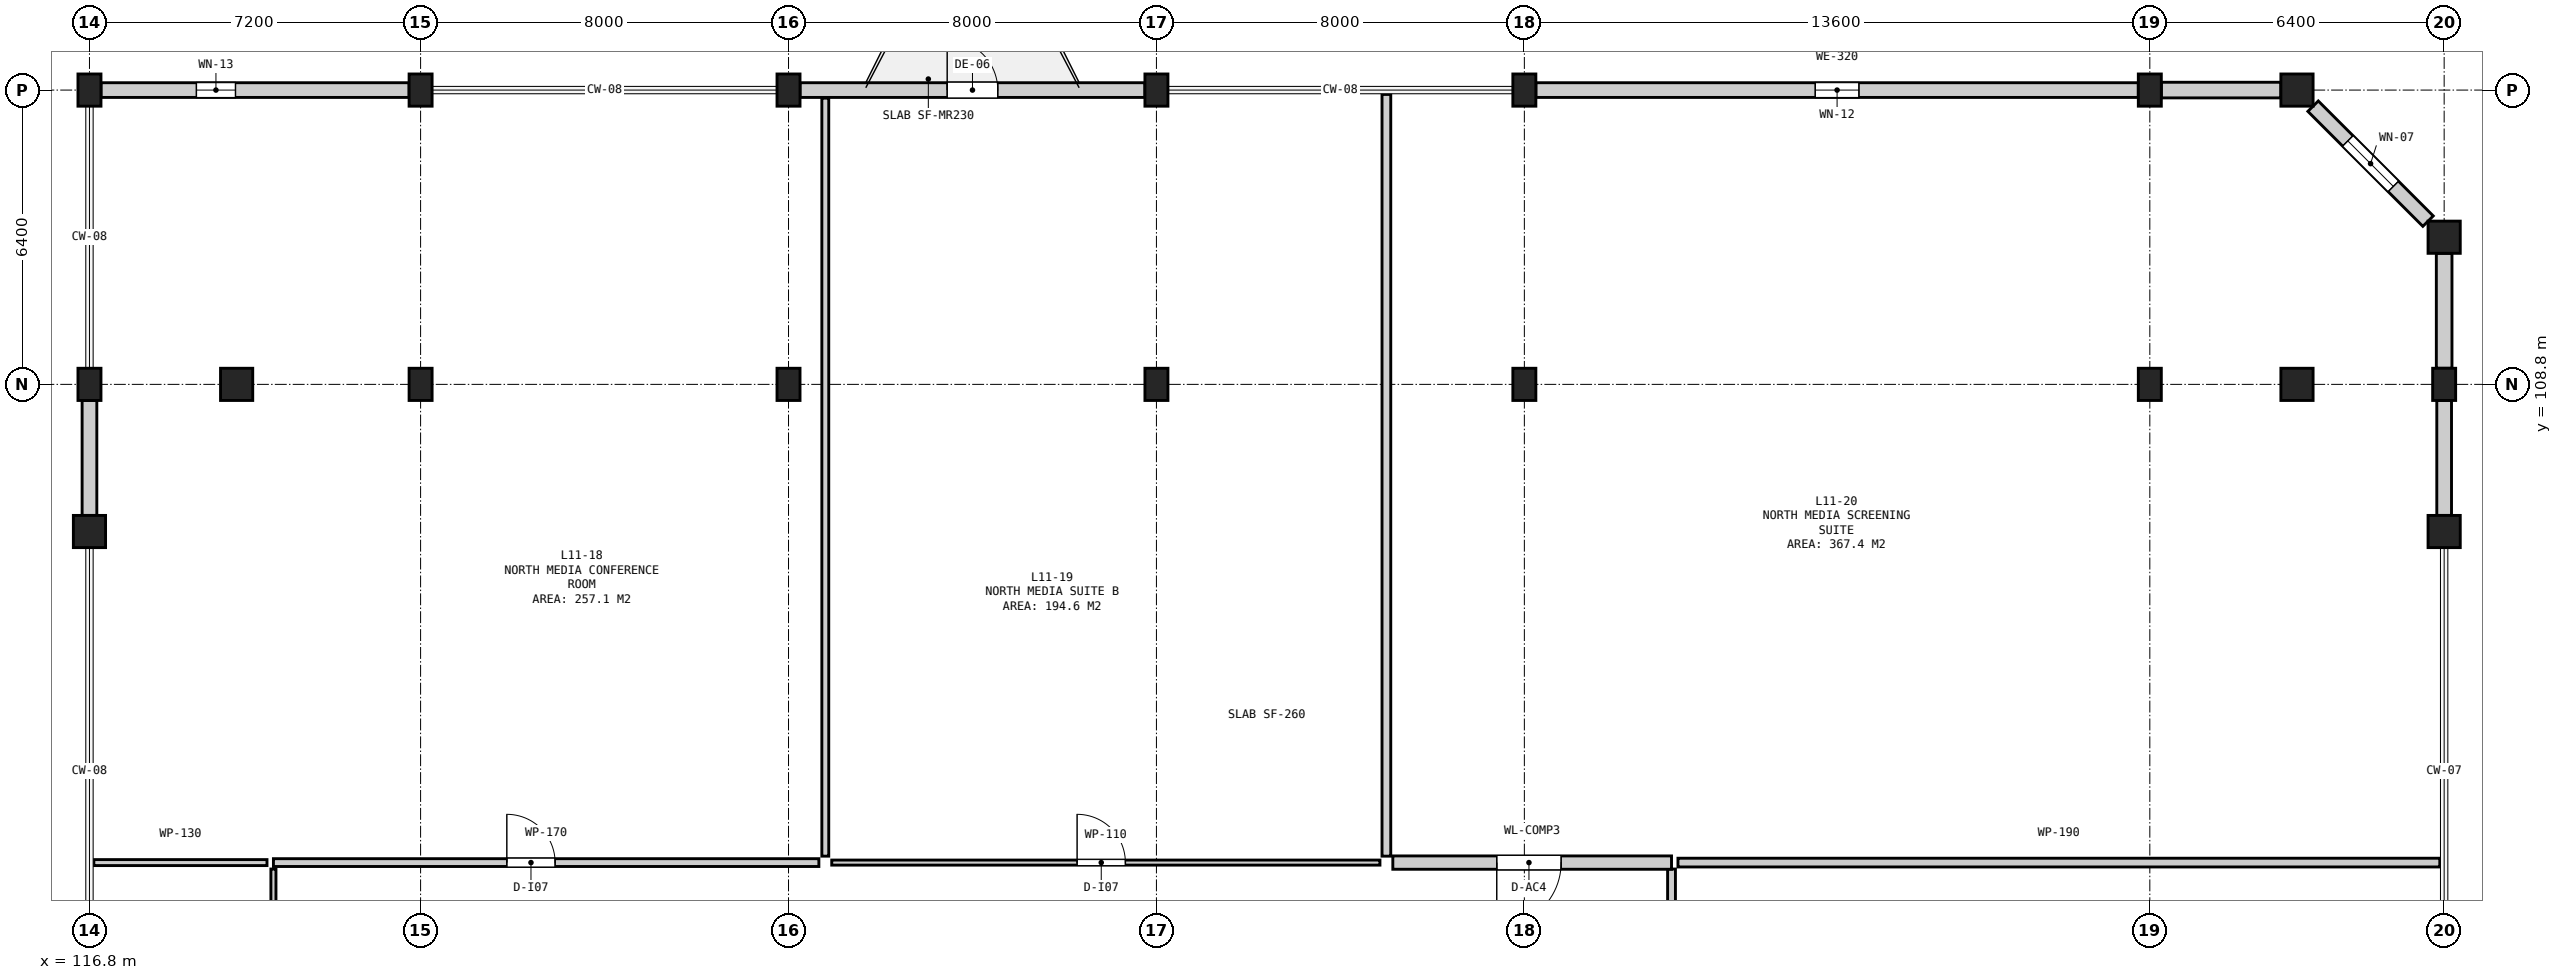
"""IFC4 building model, lengths in metres.
Left out: names, types, materials, properties, quantities, classifications, styles, units other than length and angle.
Written with IfcOpenShell. Run it as: python <this file> out.ifc"""

import sys

from ifc_helpers import new_model, si_unit, direction, frame, frame_2d, origin, origin_2d, place, context, subcontext, project, spatial, rectangle, circle, extrude, element, fill, save


model = new_model("IFC4")
c1 = context("Model", 3, precision=1e-05, world=origin(), true_north=direction((0.0, 1.0)))
c2 = subcontext(c1, "Body", "Model", "MODEL_VIEW")
j1 = project(units=[si_unit("LENGTHUNIT", "METRE"), si_unit("PLANEANGLEUNIT", "RADIAN")], contexts=[c1])
p1 = place(None, origin())
s1 = spatial("IfcSite", under=j1, at=p1, CompositionType="ELEMENT")
p2 = place(p1, origin())
s2 = spatial("IfcBuilding", under=s1, at=p2, CompositionType="ELEMENT")
p3 = place(p2, frame((0.0, 0.0, 47.1)))
s3 = spatial("IfcBuildingStorey", under=s2, at=p3, CompositionType="ELEMENT", Elevation=47.1)
p4 = place(p3, frame((116.8, 105.6, 0.0), z_axis=(0.0, 0.0, 1.0), x_axis=(1.0, 0.0, 0.0)))
e1 = element("IfcColumn", 1, at=p4, inside=s3, PredefinedType="COLUMN", context=c2, shape_type="SweptSolid", body=[
    extrude(circle(Radius=0.35, at=origin_2d()), origin(), (0.0, 0.0, 1.0), 3.8),
])
for number, where, z_axis, x_axis in (
    (2, (116.8, 108.8, 0.0), (0.0, 0.0, 1.0), (1.0, 0.0, 0.0)),
    (3, (116.8, 115.2, 0.0), (0.0, 0.0, 1.0), (1.0, 0.0, 0.0)),
):
    element("IfcColumn", number, at=place(p3, frame(where, z_axis=z_axis, x_axis=x_axis)), inside=s3, PredefinedType="COLUMN", context=c2, shape_type="SweptSolid", body=[
        extrude(rectangle(XDim=0.5, YDim=0.7, at=origin_2d()), origin(), (0.0, 0.0, 1.0), 3.8),
    ])
p5 = place(p3, frame((120.0, 108.8, 0.0), z_axis=(0.0, 0.0, 1.0), x_axis=(1.0, 0.0, 0.0)))
e4 = element("IfcColumn", 4, at=p5, inside=s3, PredefinedType="COLUMN", context=c2, shape_type="SweptSolid", body=[
    extrude(circle(Radius=0.35, at=origin_2d()), origin(), (0.0, 0.0, 1.0), 3.8),
])
for number, where, z_axis, x_axis in (
    (5, (124.0, 108.8, 0.0), (0.0, 0.0, 1.0), (1.0, 0.0, 0.0)),
    (6, (124.0, 115.2, 0.0), (0.0, 0.0, 1.0), (1.0, 0.0, 0.0)),
    (7, (132.0, 108.8, 0.0), (0.0, 0.0, 1.0), (1.0, 0.0, 0.0)),
    (8, (132.0, 115.2, 0.0), (0.0, 0.0, 1.0), (1.0, 0.0, 0.0)),
    (9, (140.0, 108.8, 0.0), (0.0, 0.0, 1.0), (1.0, 0.0, 0.0)),
    (10, (140.0, 115.2, 0.0), (0.0, 0.0, 1.0), (1.0, 0.0, 0.0)),
    (11, (148.0, 108.8, 0.0), (0.0, 0.0, 1.0), (1.0, 0.0, 0.0)),
    (12, (148.0, 115.2, 0.0), (0.0, 0.0, 1.0), (1.0, 0.0, 0.0)),
    (13, (161.6, 108.8, 0.0), (0.0, 0.0, 1.0), (1.0, 0.0, 0.0)),
    (14, (161.6, 115.2, 0.0), (0.0, 0.0, 1.0), (1.0, 0.0, 0.0)),
):
    element("IfcColumn", number, at=place(p3, frame(where, z_axis=z_axis, x_axis=x_axis)), inside=s3, PredefinedType="COLUMN", context=c2, shape_type="SweptSolid", body=[
        extrude(rectangle(XDim=0.5, YDim=0.7, at=origin_2d()), origin(), (0.0, 0.0, 1.0), 3.8),
    ])
for number, where, z_axis, x_axis in (
    (15, (164.8, 108.8, 0.0), (0.0, 0.0, 1.0), (1.0, 0.0, 0.0)),
    (16, (164.8, 115.2, 0.0), (0.0, 0.0, 1.0), (1.0, 0.0, 0.0)),
    (17, (168.0, 105.6, 0.0), (0.0, 0.0, 1.0), (1.0, 0.0, 0.0)),
):
    element("IfcColumn", number, at=place(p3, frame(where, z_axis=z_axis, x_axis=x_axis)), inside=s3, PredefinedType="COLUMN", context=c2, shape_type="SweptSolid", body=[
        extrude(circle(Radius=0.35, at=origin_2d()), origin(), (0.0, 0.0, 1.0), 3.8),
    ])
p6 = place(p3, frame((168.0, 108.8, 0.0), z_axis=(0.0, 0.0, 1.0), x_axis=(1.0, 0.0, 0.0)))
e18 = element("IfcColumn", 18, at=p6, inside=s3, PredefinedType="COLUMN", context=c2, shape_type="SweptSolid", body=[
    extrude(rectangle(XDim=0.5, YDim=0.7, at=origin_2d()), origin(), (0.0, 0.0, 1.0), 3.8),
])
p7 = place(p3, frame((168.0, 112.0, 0.0), z_axis=(0.0, 0.0, 1.0), x_axis=(1.0, 0.0, 0.0)))
e19 = element("IfcColumn", 19, at=p7, inside=s3, PredefinedType="COLUMN", context=c2, shape_type="SweptSolid", body=[
    extrude(circle(Radius=0.35, at=origin_2d()), origin(), (0.0, 0.0, 1.0), 3.8),
])
p8 = place(p3, frame((168.0, 105.95, 0.0), z_axis=(0.0, 0.0, 1.0), x_axis=(0.0, 1.0, 0.0)))
e20 = element("IfcWall", 20, at=p8, inside=s3, PredefinedType="SOLIDWALL", context=c2, shape_type="SweptSolid", body=[
    extrude(rectangle(XDim=2.5, YDim=0.32, at=frame_2d((1.25, 0.0))), origin(), (0.0, 0.0, 1.0), 2.885),
])
p9 = place(p3, frame((168.0, 109.15, 0.0), z_axis=(0.0, 0.0, 1.0), x_axis=(0.0, 1.0, 0.0)))
e21 = element("IfcWall", 21, at=p9, inside=s3, PredefinedType="SOLIDWALL", context=c2, shape_type="SweptSolid", body=[
    extrude(rectangle(XDim=2.5, YDim=0.34, at=frame_2d((1.25, 0.0))), origin(), (0.0, 0.0, 1.0), 2.9),
])
p10 = place(p3, frame((167.65, 112.35, 0.0), z_axis=(0.0, 0.0, 1.0), x_axis=(-0.707106781187, 0.707106781187, 0.0)))
e22 = element("IfcWall", 22, at=p10, inside=s3, PredefinedType="SOLIDWALL", context=c2, shape_type="SweptSolid", body=[
    extrude(rectangle(XDim=3.536, YDim=0.32, at=frame_2d((1.768, 0.0))), origin(), (0.0, 0.0, 1.0), 2.895),
])
p11 = place(p10, frame((1.068, 0.0, 0.9)))
e23 = element("IfcOpeningElement", 23, at=p11, cuts=e22, PredefinedType="OPENING", context=c2, shape_type="SweptSolid", body=[
    extrude(rectangle(XDim=1.4, YDim=1.8, at=frame_2d((0.7, 0.9))), frame((0.0, 0.172, 0.0), z_axis=(0.0, -1.0, 0.0), x_axis=(1.0, 0.0, 0.0)), (0.0, 0.0, 1.0), 0.344),
])
p12 = place(p3, frame((164.45, 115.2, 0.0), z_axis=(0.0, 0.0, 1.0), x_axis=(-1.0, 0.0, 0.0)))
e24 = element("IfcWall", 24, at=p12, inside=s3, PredefinedType="SOLIDWALL", context=c2, shape_type="SweptSolid", body=[
    extrude(rectangle(XDim=2.6, YDim=0.34, at=frame_2d((1.3, 0.0))), origin(), (0.0, 0.0, 1.0), 2.9),
])
p13 = place(p3, frame((161.35, 115.2, 0.0), z_axis=(0.0, 0.0, 1.0), x_axis=(-1.0, 0.0, 0.0)))
e25 = element("IfcWall", 25, at=p13, inside=s3, PredefinedType="SOLIDWALL", context=c2, shape_type="SweptSolid", body=[
    extrude(rectangle(XDim=13.1, YDim=0.32, at=frame_2d((6.55, 0.0))), origin(), (0.0, 0.0, 1.0), 2.435),
])
p14 = place(p13, frame((6.075, 0.0, 0.8)))
e26 = element("IfcOpeningElement", 26, at=p14, cuts=e25, PredefinedType="OPENING", context=c2, shape_type="SweptSolid", body=[
    extrude(rectangle(XDim=0.95, YDim=1.45, at=frame_2d((0.475, 0.725))), frame((0.0, 0.172, 0.0), z_axis=(0.0, -1.0, 0.0), x_axis=(1.0, 0.0, 0.0)), (0.0, 0.0, 1.0), 0.344),
])
p15 = place(p3, frame((139.75, 115.2, 0.0), z_axis=(0.0, 0.0, 1.0), x_axis=(-1.0, 0.0, 0.0)))
e27 = element("IfcWall", 27, at=p15, inside=s3, PredefinedType="SOLIDWALL", context=c2, shape_type="SweptSolid", body=[
    extrude(rectangle(XDim=7.5, YDim=0.32, at=frame_2d((3.75, 0.0))), origin(), (0.0, 0.0, 1.0), 2.9),
])
p16 = place(p15, frame((3.2, 0.0, 0.0)))
e28 = element("IfcOpeningElement", 28, at=p16, cuts=e27, PredefinedType="OPENING", context=c2, shape_type="SweptSolid", body=[
    extrude(rectangle(XDim=1.1, YDim=2.2, at=frame_2d((0.55, 1.1))), frame((0.0, 0.172, 0.0), z_axis=(0.0, -1.0, 0.0), x_axis=(1.0, 0.0, 0.0)), (0.0, 0.0, 1.0), 0.344),
])
p17 = place(p3, frame((123.75, 115.2, 0.0), z_axis=(0.0, 0.0, 1.0), x_axis=(-1.0, 0.0, 0.0)))
e29 = element("IfcWall", 29, at=p17, inside=s3, PredefinedType="SOLIDWALL", context=c2, shape_type="SweptSolid", body=[
    extrude(rectangle(XDim=6.7, YDim=0.32, at=frame_2d((3.35, 0.0))), origin(), (0.0, 0.0, 1.0), 2.9),
])
p18 = place(p17, frame((3.775, 0.0, 0.9)))
e30 = element("IfcOpeningElement", 30, at=p18, cuts=e29, PredefinedType="OPENING", context=c2, shape_type="SweptSolid", body=[
    extrude(rectangle(XDim=0.85, YDim=1.35, at=frame_2d((0.425, 0.675))), frame((0.0, 0.172, 0.0), z_axis=(0.0, -1.0, 0.0), x_axis=(1.0, 0.0, 0.0)), (0.0, 0.0, 1.0), 0.344),
])
p19 = place(p3, frame((116.8, 108.45, 0.0), z_axis=(0.0, 0.0, 1.0), x_axis=(0.0, -1.0, 0.0)))
e31 = element("IfcWall", 31, at=p19, inside=s3, PredefinedType="SOLIDWALL", context=c2, shape_type="SweptSolid", body=[
    extrude(rectangle(XDim=2.5, YDim=0.32, at=frame_2d((1.25, 0.0))), origin(), (0.0, 0.0, 1.0), 2.885),
])
p20 = place(p3, frame((151.34, 98.4, 0.0), z_axis=(0.0, 0.0, 1.0), x_axis=(1.0, 0.0, 0.0)))
e32 = element("IfcWall", 32, at=p20, inside=s3, PredefinedType="PARTITIONING", context=c2, shape_type="SweptSolid", body=[
    extrude(rectangle(XDim=16.565, YDim=0.19, at=frame_2d((8.282, 0.0))), origin(), (0.0, 0.0, 1.0), 3.52),
])
p21 = place(p3, frame((151.2, 76.14, 0.0), z_axis=(0.0, 0.0, 1.0), x_axis=(0.0, 1.0, 0.0)))
e33 = element("IfcWall", 33, at=p21, inside=s3, PredefinedType="PARTITIONING", context=c2, shape_type="SweptSolid", body=[
    extrude(rectangle(XDim=22.12, YDim=0.17, at=frame_2d((11.06, 0.0))), origin(), (0.0, 0.0, 1.0), 3.52),
])
p22 = place(p21, frame((10.535, 0.0, 0.0)))
e34 = element("IfcOpeningElement", 34, at=p22, cuts=e33, PredefinedType="OPENING", context=c2, shape_type="SweptSolid", body=[
    extrude(rectangle(XDim=1.05, YDim=2.15, at=frame_2d((0.525, 1.075))), frame((0.0, 0.097, 0.0), z_axis=(0.0, -1.0, 0.0), x_axis=(1.0, 0.0, 0.0)), (0.0, 0.0, 1.0), 0.194),
])
p23 = place(p3, frame((116.895, 98.4, 0.0), z_axis=(0.0, 0.0, 1.0), x_axis=(1.0, 0.0, 0.0)))
e35 = element("IfcWall", 35, at=p23, inside=s3, PredefinedType="PARTITIONING", context=c2, shape_type="SweptSolid", body=[
    extrude(rectangle(XDim=3.765, YDim=0.13, at=frame_2d((1.882, 0.0))), origin(), (0.0, 0.0, 1.0), 3.52),
])
p24 = place(p3, frame((120.8, 72.095, 0.0), z_axis=(0.0, 0.0, 1.0), x_axis=(0.0, 1.0, 0.0)))
e36 = element("IfcWall", 36, at=p24, inside=s3, PredefinedType="PARTITIONING", context=c2, shape_type="SweptSolid", body=[
    extrude(rectangle(XDim=26.165, YDim=0.11, at=frame_2d((13.083, 0.0))), origin(), (0.0, 0.0, 1.0), 3.52),
])
p25 = place(p24, frame((18.38, 0.0, 0.0)))
e37 = element("IfcOpeningElement", 37, at=p25, cuts=e36, PredefinedType="OPENING", context=c2, shape_type="SweptSolid", body=[
    extrude(rectangle(XDim=1.05, YDim=2.15, at=frame_2d((0.525, 1.075))), frame((0.0, 0.067, 0.0), z_axis=(0.0, -1.0, 0.0), x_axis=(1.0, 0.0, 0.0)), (0.0, 0.0, 1.0), 0.134),
])
p26 = place(p3, frame((120.8, 98.4, 0.0), z_axis=(0.0, 0.0, 1.0), x_axis=(1.0, 0.0, 0.0)))
e38 = element("IfcWall", 38, at=p26, inside=s3, PredefinedType="PARTITIONING", context=c2, shape_type="SweptSolid", body=[
    extrude(rectangle(XDim=11.86, YDim=0.17, at=frame_2d((5.93, 0.0))), origin(), (0.0, 0.0, 1.0), 3.52),
])
p27 = place(p26, frame((5.075, 0.0, 0.0)))
e39 = element("IfcOpeningElement", 39, at=p27, cuts=e38, PredefinedType="OPENING", context=c2, shape_type="SweptSolid", body=[
    extrude(rectangle(XDim=1.05, YDim=2.15, at=frame_2d((0.525, 1.075))), frame((0.0, 0.097, 0.0), z_axis=(0.0, -1.0, 0.0), x_axis=(1.0, 0.0, 0.0)), (0.0, 0.0, 1.0), 0.194),
])
p28 = place(p3, frame((132.8, 98.54, 0.0), z_axis=(0.0, 0.0, 1.0), x_axis=(0.0, 1.0, 0.0)))
e40 = element("IfcWall", 40, at=p28, inside=s3, PredefinedType="PARTITIONING", context=c2, shape_type="SweptSolid", body=[
    extrude(rectangle(XDim=16.485, YDim=0.15, at=frame_2d((8.242, 0.0))), origin(), (0.0, 0.0, 1.0), 3.52),
])
p29 = place(p3, frame((132.94, 98.4, 0.0), z_axis=(0.0, 0.0, 1.0), x_axis=(1.0, 0.0, 0.0)))
e41 = element("IfcWall", 41, at=p29, inside=s3, PredefinedType="PARTITIONING", context=c2, shape_type="SweptSolid", body=[
    extrude(rectangle(XDim=11.92, YDim=0.11, at=frame_2d((5.96, 0.0))), origin(), (0.0, 0.0, 1.0), 3.52),
])
p30 = place(p29, frame((5.335, 0.0, 0.0)))
e42 = element("IfcOpeningElement", 42, at=p30, cuts=e41, PredefinedType="OPENING", context=c2, shape_type="SweptSolid", body=[
    extrude(rectangle(XDim=1.05, YDim=2.15, at=frame_2d((0.525, 1.075))), frame((0.0, 0.067, 0.0), z_axis=(0.0, -1.0, 0.0), x_axis=(1.0, 0.0, 0.0)), (0.0, 0.0, 1.0), 0.134),
])
p31 = place(p3, frame((145.0, 98.54, 0.0), z_axis=(0.0, 0.0, 1.0), x_axis=(0.0, 1.0, 0.0)))
e43 = element("IfcWall", 43, at=p31, inside=s3, PredefinedType="PARTITIONING", context=c2, shape_type="SweptSolid", body=[
    extrude(rectangle(XDim=16.565, YDim=0.19, at=frame_2d((8.282, 0.0))), origin(), (0.0, 0.0, 1.0), 3.52),
])
p32 = place(p3, frame((145.14, 98.4, 0.0), z_axis=(0.0, 0.0, 1.0), x_axis=(1.0, 0.0, 0.0)))
e44 = element("IfcWall", 44, at=p32, inside=s3, PredefinedType="SOLIDWALL", context=c2, shape_type="SweptSolid", body=[
    extrude(rectangle(XDim=6.06, YDim=0.29, at=frame_2d((3.03, 0.0))), origin(), (0.0, 0.0, 1.0), 3.52),
])
p33 = place(p32, frame((2.26, 0.0, 0.0)))
e45 = element("IfcOpeningElement", 45, at=p33, cuts=e44, PredefinedType="OPENING", context=c2, shape_type="SweptSolid", body=[
    extrude(rectangle(XDim=1.4, YDim=2.2, at=frame_2d((0.7, 1.1))), frame((0.0, 0.157, 0.0), z_axis=(0.0, -1.0, 0.0), x_axis=(1.0, 0.0, 0.0)), (0.0, 0.0, 1.0), 0.314),
])
p34 = place(p11, origin())
e46 = element("IfcWindow", 46, at=p34, inside=s3, PartitioningType="SINGLE_PANEL", PredefinedType="WINDOW", context=c2, shape_type="SweptSolid", body=[
    extrude(rectangle(XDim=1.4, YDim=1.8, at=frame_2d((0.7, 0.9))), frame((0.0, 0.03, 0.0), z_axis=(0.0, -1.0, 0.0), x_axis=(1.0, 0.0, 0.0)), (0.0, 0.0, 1.0), 0.06),
])
fill(e23, e46)
p35 = place(p14, origin())
e47 = element("IfcWindow", 47, at=p35, inside=s3, PartitioningType="SINGLE_PANEL", PredefinedType="WINDOW", context=c2, shape_type="SweptSolid", body=[
    extrude(rectangle(XDim=0.95, YDim=1.45, at=frame_2d((0.475, 0.725))), frame((0.0, 0.03, 0.0), z_axis=(0.0, -1.0, 0.0), x_axis=(1.0, 0.0, 0.0)), (0.0, 0.0, 1.0), 0.06),
])
fill(e26, e47)
p36 = place(p16, frame((1.1, 0.0, 0.0), z_axis=(0.0, 0.0, 1.0), x_axis=(-1.0, 0.0, 0.0)))
e48 = element("IfcDoor", 48, at=p36, inside=s3, OperationType="SINGLE_SWING_LEFT", PredefinedType="DOOR", context=c2, shape_type="SweptSolid", body=[
    extrude(rectangle(XDim=1.1, YDim=2.2, at=frame_2d((0.55, 1.1))), frame((0.0, 0.025, 0.0), z_axis=(0.0, -1.0, 0.0), x_axis=(1.0, 0.0, 0.0)), (0.0, 0.0, 1.0), 0.05),
])
fill(e28, e48)
p37 = place(p18, origin())
e49 = element("IfcWindow", 49, at=p37, inside=s3, PartitioningType="SINGLE_PANEL", PredefinedType="WINDOW", context=c2, shape_type="SweptSolid", body=[
    extrude(rectangle(XDim=0.85, YDim=1.35, at=frame_2d((0.425, 0.675))), frame((0.0, 0.03, 0.0), z_axis=(0.0, -1.0, 0.0), x_axis=(1.0, 0.0, 0.0)), (0.0, 0.0, 1.0), 0.06),
])
fill(e30, e49)
p38 = place(p27, origin())
e50 = element("IfcDoor", 50, at=p38, inside=s3, OperationType="SINGLE_SWING_LEFT", PredefinedType="DOOR", context=c2, shape_type="SweptSolid", body=[
    extrude(rectangle(XDim=1.05, YDim=2.15, at=frame_2d((0.525, 1.075))), frame((0.0, 0.025, 0.0), z_axis=(0.0, -1.0, 0.0), x_axis=(1.0, 0.0, 0.0)), (0.0, 0.0, 1.0), 0.05),
])
fill(e39, e50)
p39 = place(p30, origin())
e51 = element("IfcDoor", 51, at=p39, inside=s3, OperationType="SINGLE_SWING_LEFT", PredefinedType="DOOR", context=c2, shape_type="SweptSolid", body=[
    extrude(rectangle(XDim=1.05, YDim=2.15, at=frame_2d((0.525, 1.075))), frame((0.0, 0.025, 0.0), z_axis=(0.0, -1.0, 0.0), x_axis=(1.0, 0.0, 0.0)), (0.0, 0.0, 1.0), 0.05),
])
fill(e42, e51)
p40 = place(p33, frame((1.4, 0.0, 0.0), z_axis=(0.0, 0.0, 1.0), x_axis=(-1.0, 0.0, 0.0)))
e52 = element("IfcDoor", 52, at=p40, inside=s3, OperationType="SINGLE_SWING_RIGHT", PredefinedType="DOOR", context=c2, shape_type="SweptSolid", body=[
    extrude(rectangle(XDim=1.4, YDim=2.2, at=frame_2d((0.7, 1.1))), frame((0.0, 0.025, 0.0), z_axis=(0.0, -1.0, 0.0), x_axis=(1.0, 0.0, 0.0)), (0.0, 0.0, 1.0), 0.05),
])
fill(e45, e52)
save(model, sys.argv[1])
